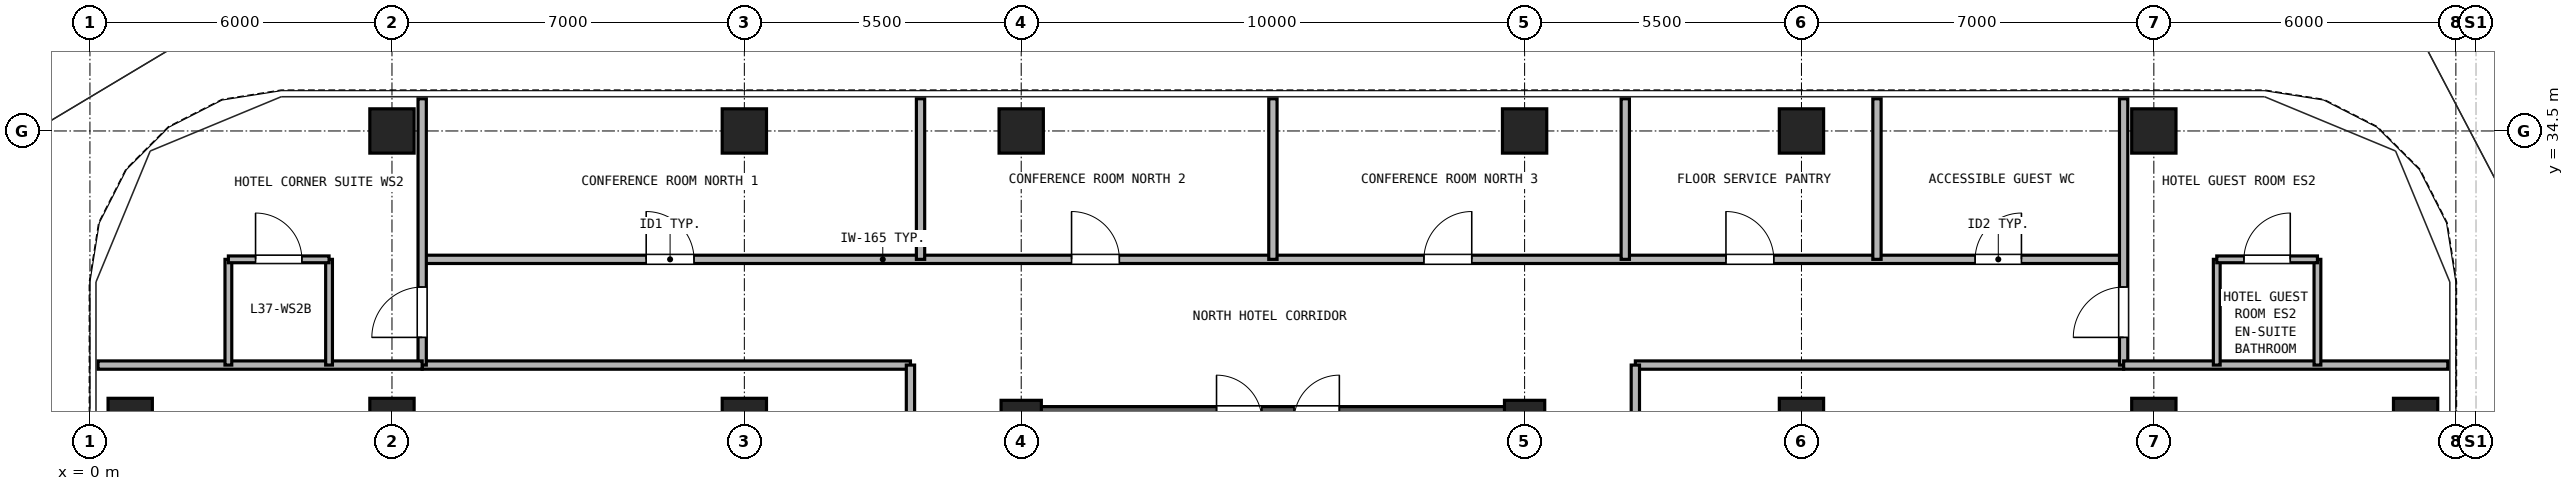
"""IFC4 building model, lengths in metres.
Left out: names, types, materials, properties, quantities, classifications, styles, units other than length and angle.
Written with IfcOpenShell. Run it as: python <this file> out.ifc"""

import sys

from ifc_helpers import new_model, si_unit, direction, frame, frame_2d, origin, origin_2d, place, context, subcontext, project, spatial, rectangle, hollow_rectangle, extrude, source, transform, mapped, element, fill, save


model = new_model("IFC4")
c1 = context("Model", 3, precision=1e-05, world=origin(), true_north=direction((0.0, 1.0)))
c2 = subcontext(c1, "Body", "Model", "MODEL_VIEW")
j1 = project(units=[si_unit("LENGTHUNIT", "METRE"), si_unit("PLANEANGLEUNIT", "RADIAN")], contexts=[c1])
p1 = place(None, origin())
s1 = spatial("IfcSite", under=j1, at=p1, CompositionType="ELEMENT")
p2 = place(p1, origin())
s2 = spatial("IfcBuilding", under=s1, at=p2, CompositionType="ELEMENT")
p3 = place(p2, frame((0.0, 0.0, 134.3)))
s3 = spatial("IfcBuildingStorey", under=s2, at=p3, CompositionType="ELEMENT", Elevation=134.3)
m1 = source(origin(), c2, "Body", "SweptSolid", [
    extrude(hollow_rectangle(XDim=0.88, YDim=0.88, WallThickness=0.05, at=origin_2d()), origin(), (0.0, 0.0, 1.0), 2.95),
])
for number, where, z_axis, x_axis in (
    (1, (6.0, 34.5, 0.0), (0.0, 0.0, 1.0), (1.0, 0.0, 0.0)),
    (2, (13.0, 34.5, 0.0), (0.0, 0.0, 1.0), (1.0, 0.0, 0.0)),
    (3, (18.5, 34.5, 0.0), (0.0, 0.0, 1.0), (1.0, 0.0, 0.0)),
    (4, (28.5, 34.5, 0.0), (0.0, 0.0, 1.0), (1.0, 0.0, 0.0)),
    (5, (34.0, 34.5, 0.0), (0.0, 0.0, 1.0), (1.0, 0.0, 0.0)),
    (6, (41.0, 34.5, 0.0), (0.0, 0.0, 1.0), (1.0, 0.0, 0.0)),
    (7, (0.8, 28.75, 0.0), (0.0, 0.0, 1.0), (1.0, 0.0, 0.0)),
    (8, (46.2, 28.75, 0.0), (0.0, 0.0, 1.0), (1.0, 0.0, 0.0)),
    (9, (6.0, 28.75, 0.0), (0.0, 0.0, 1.0), (1.0, 0.0, 0.0)),
    (10, (13.0, 28.75, 0.0), (0.0, 0.0, 1.0), (1.0, 0.0, 0.0)),
):
    element("IfcColumn", number, at=place(p3, frame(where, z_axis=z_axis, x_axis=x_axis)), inside=s3, PredefinedType="COLUMN", context=c2, shape_type="MappedRepresentation", body=[
        mapped(m1, transform((0.0, 0.0, 0.0), x_axis=(1.0, 0.0, 0.0), y_axis=(0.0, 1.0, 0.0), z_axis=(0.0, 0.0, 1.0), scale=1.0)),
    ])
m2 = source(origin(), c2, "Body", "SweptSolid", [
    extrude(hollow_rectangle(XDim=0.8, YDim=0.8, WallThickness=0.045, at=origin_2d()), origin(), (0.0, 0.0, 1.0), 2.95),
])
for number, where, z_axis, x_axis in (
    (11, (18.5, 28.75, 0.0), (0.0, 0.0, 1.0), (1.0, 0.0, 0.0)),
    (12, (28.5, 28.75, 0.0), (0.0, 0.0, 1.0), (1.0, 0.0, 0.0)),
):
    element("IfcColumn", number, at=place(p3, frame(where, z_axis=z_axis, x_axis=x_axis)), inside=s3, PredefinedType="COLUMN", context=c2, shape_type="MappedRepresentation", body=[
        mapped(m2, transform((0.0, 0.0, 0.0), x_axis=(1.0, 0.0, 0.0), y_axis=(0.0, 1.0, 0.0), z_axis=(0.0, 0.0, 1.0), scale=1.0)),
    ])
for number, where, z_axis, x_axis in (
    (13, (34.0, 28.75, 0.0), (0.0, 0.0, 1.0), (1.0, 0.0, 0.0)),
    (14, (41.0, 28.75, 0.0), (0.0, 0.0, 1.0), (1.0, 0.0, 0.0)),
):
    element("IfcColumn", number, at=place(p3, frame(where, z_axis=z_axis, x_axis=x_axis)), inside=s3, PredefinedType="COLUMN", context=c2, shape_type="MappedRepresentation", body=[
        mapped(m1, transform((0.0, 0.0, 0.0), x_axis=(1.0, 0.0, 0.0), y_axis=(0.0, 1.0, 0.0), z_axis=(0.0, 0.0, 1.0), scale=1.0)),
    ])
p4 = place(p3, frame((18.225, 28.75, 0.0), z_axis=(0.0, 0.0, 1.0), x_axis=(1.0, 0.0, 0.0)))
e15 = element("IfcWall", 15, at=p4, inside=s3, PredefinedType="SHEAR", context=c2, shape_type="SweptSolid", body=[
    extrude(rectangle(XDim=10.55, YDim=0.55, at=frame_2d((5.275, 0.0))), origin(), (0.0, 0.0, 1.0), 2.95),
])
p5 = place(p4, frame((4.155, 0.0, 0.0)))
e16 = element("IfcOpeningElement", 16, at=p5, cuts=e15, PredefinedType="OPENING", context=c2, shape_type="SweptSolid", body=[
    extrude(rectangle(XDim=0.9, YDim=2.05, at=frame_2d((0.45, 1.025))), frame((0.0, 0.285, 0.0), z_axis=(0.0, -1.0, 0.0), x_axis=(1.0, 0.0, 0.0)), (0.0, 0.0, 1.0), 0.57),
])
p6 = place(p4, frame((5.695, 0.0, 0.0)))
e17 = element("IfcOpeningElement", 17, at=p6, cuts=e15, PredefinedType="OPENING", context=c2, shape_type="SweptSolid", body=[
    extrude(rectangle(XDim=0.9, YDim=2.05, at=frame_2d((0.45, 1.025))), frame((0.0, 0.285, 0.0), z_axis=(0.0, -1.0, 0.0), x_axis=(1.0, 0.0, 0.0)), (0.0, 0.0, 1.0), 0.57),
])
p7 = place(p3, frame((6.6, 31.95, 0.0), z_axis=(0.0, 0.0, 1.0), x_axis=(1.0, 0.0, 0.0)))
e18 = element("IfcWall", 18, at=p7, inside=s3, PredefinedType="PARTITIONING", context=c2, shape_type="SweptSolid", body=[
    extrude(rectangle(XDim=33.8, YDim=0.165, at=frame_2d((16.9, 0.0))), origin(), (0.0, 0.0, 1.0), 2.95),
])
p8 = place(p7, frame((4.45, 0.0, 0.0)))
e19 = element("IfcOpeningElement", 19, at=p8, cuts=e18, PredefinedType="OPENING", context=c2, shape_type="SweptSolid", body=[
    extrude(rectangle(XDim=0.95, YDim=2.15, at=frame_2d((0.475, 1.075))), frame((0.0, 0.093, 0.0), z_axis=(0.0, -1.0, 0.0), x_axis=(1.0, 0.0, 0.0)), (0.0, 0.0, 1.0), 0.185),
])
p9 = place(p7, frame((12.9, 0.0, 0.0)))
e20 = element("IfcOpeningElement", 20, at=p9, cuts=e18, PredefinedType="OPENING", context=c2, shape_type="SweptSolid", body=[
    extrude(rectangle(XDim=0.95, YDim=2.15, at=frame_2d((0.475, 1.075))), frame((0.0, 0.093, 0.0), z_axis=(0.0, -1.0, 0.0), x_axis=(1.0, 0.0, 0.0)), (0.0, 0.0, 1.0), 0.185),
])
p10 = place(p7, frame((19.9, 0.0, 0.0)))
e21 = element("IfcOpeningElement", 21, at=p10, cuts=e18, PredefinedType="OPENING", context=c2, shape_type="SweptSolid", body=[
    extrude(rectangle(XDim=0.95, YDim=2.15, at=frame_2d((0.475, 1.075))), frame((0.0, 0.093, 0.0), z_axis=(0.0, -1.0, 0.0), x_axis=(1.0, 0.0, 0.0)), (0.0, 0.0, 1.0), 0.185),
])
p11 = place(p7, frame((25.9, 0.0, 0.0)))
e22 = element("IfcOpeningElement", 22, at=p11, cuts=e18, PredefinedType="OPENING", context=c2, shape_type="SweptSolid", body=[
    extrude(rectangle(XDim=0.95, YDim=2.15, at=frame_2d((0.475, 1.075))), frame((0.0, 0.093, 0.0), z_axis=(0.0, -1.0, 0.0), x_axis=(1.0, 0.0, 0.0)), (0.0, 0.0, 1.0), 0.185),
])
p12 = place(p7, frame((30.85, 0.0, 0.0)))
e23 = element("IfcOpeningElement", 23, at=p12, cuts=e18, PredefinedType="OPENING", context=c2, shape_type="SweptSolid", body=[
    extrude(rectangle(XDim=0.92, YDim=2.1, at=frame_2d((0.46, 1.05))), frame((0.0, 0.093, 0.0), z_axis=(0.0, -1.0, 0.0), x_axis=(1.0, 0.0, 0.0)), (0.0, 0.0, 1.0), 0.185),
])
for number, where, z_axis, x_axis in (
    (24, (6.6, 29.85, 0.0), (0.0, 0.0, 1.0), (1.0, 0.0, 0.0)),
    (25, (30.7, 29.85, 0.0), (0.0, 0.0, 1.0), (1.0, 0.0, 0.0)),
):
    element("IfcWall", number, at=place(p3, frame(where, z_axis=z_axis, x_axis=x_axis)), inside=s3, PredefinedType="PARTITIONING", context=c2, shape_type="SweptSolid", body=[
        extrude(rectangle(XDim=9.7, YDim=0.165, at=frame_2d((4.85, 0.0))), origin(), (0.0, 0.0, 1.0), 2.95),
    ])
p13 = place(p3, frame((16.3, 11.15, 0.0), z_axis=(0.0, 0.0, 1.0), x_axis=(0.0, 1.0, 0.0)))
e26 = element("IfcWall", 26, at=p13, inside=s3, PredefinedType="PARTITIONING", context=c2, shape_type="SweptSolid", body=[
    extrude(rectangle(XDim=18.7, YDim=0.165, at=frame_2d((9.35, 0.0))), origin(), (0.0, 0.0, 1.0), 2.95),
])
p14 = place(p13, frame((2.75, 0.0, 0.0)))
e27 = element("IfcOpeningElement", 27, at=p14, cuts=e26, PredefinedType="OPENING", context=c2, shape_type="SweptSolid", body=[
    extrude(rectangle(XDim=0.95, YDim=2.15, at=frame_2d((0.475, 1.075))), frame((0.0, 0.093, 0.0), z_axis=(0.0, -1.0, 0.0), x_axis=(1.0, 0.0, 0.0)), (0.0, 0.0, 1.0), 0.185),
])
p15 = place(p13, frame((12.1, 0.0, 0.0)))
e28 = element("IfcOpeningElement", 28, at=p15, cuts=e26, PredefinedType="OPENING", context=c2, shape_type="SweptSolid", body=[
    extrude(rectangle(XDim=0.95, YDim=2.15, at=frame_2d((0.475, 1.075))), frame((0.0, 0.093, 0.0), z_axis=(0.0, -1.0, 0.0), x_axis=(1.0, 0.0, 0.0)), (0.0, 0.0, 1.0), 0.185),
])
p16 = place(p3, frame((30.7, 11.15, 0.0), z_axis=(0.0, 0.0, 1.0), x_axis=(0.0, 1.0, 0.0)))
e29 = element("IfcWall", 29, at=p16, inside=s3, PredefinedType="PARTITIONING", context=c2, shape_type="SweptSolid", body=[
    extrude(rectangle(XDim=18.7, YDim=0.165, at=frame_2d((9.35, 0.0))), origin(), (0.0, 0.0, 1.0), 2.95),
])
p17 = place(p16, frame((4.175, 0.0, 0.0)))
e30 = element("IfcOpeningElement", 30, at=p17, cuts=e29, PredefinedType="OPENING", context=c2, shape_type="SweptSolid", body=[
    extrude(rectangle(XDim=0.95, YDim=2.15, at=frame_2d((0.475, 1.075))), frame((0.0, 0.093, 0.0), z_axis=(0.0, -1.0, 0.0), x_axis=(1.0, 0.0, 0.0)), (0.0, 0.0, 1.0), 0.185),
])
p18 = place(p16, frame((13.525, 0.0, 0.0)))
e31 = element("IfcOpeningElement", 31, at=p18, cuts=e29, PredefinedType="OPENING", context=c2, shape_type="SweptSolid", body=[
    extrude(rectangle(XDim=0.95, YDim=2.15, at=frame_2d((0.475, 1.075))), frame((0.0, 0.093, 0.0), z_axis=(0.0, -1.0, 0.0), x_axis=(1.0, 0.0, 0.0)), (0.0, 0.0, 1.0), 0.185),
])
p19 = place(p3, frame((6.6, 29.85, 0.0), z_axis=(0.0, 0.0, 1.0), x_axis=(0.0, 1.0, 0.0)))
e32 = element("IfcWall", 32, at=p19, inside=s3, PredefinedType="PARTITIONING", context=c2, shape_type="SweptSolid", body=[
    extrude(rectangle(XDim=5.29, YDim=0.165, at=frame_2d((2.645, 0.0))), origin(), (0.0, 0.0, 1.0), 2.95),
])
p20 = place(p19, frame((0.55, 0.0, 0.0)))
e33 = element("IfcOpeningElement", 33, at=p20, cuts=e32, PredefinedType="OPENING", context=c2, shape_type="SweptSolid", body=[
    extrude(rectangle(XDim=1.0, YDim=2.15, at=frame_2d((0.5, 1.075))), frame((0.0, 0.093, 0.0), z_axis=(0.0, -1.0, 0.0), x_axis=(1.0, 0.0, 0.0)), (0.0, 0.0, 1.0), 0.185),
])
p21 = place(p3, frame((40.4, 29.85, 0.0), z_axis=(0.0, 0.0, 1.0), x_axis=(0.0, 1.0, 0.0)))
e34 = element("IfcWall", 34, at=p21, inside=s3, PredefinedType="PARTITIONING", context=c2, shape_type="SweptSolid", body=[
    extrude(rectangle(XDim=5.29, YDim=0.165, at=frame_2d((2.645, 0.0))), origin(), (0.0, 0.0, 1.0), 2.95),
])
p22 = place(p21, frame((0.55, 0.0, 0.0)))
e35 = element("IfcOpeningElement", 35, at=p22, cuts=e34, PredefinedType="OPENING", context=c2, shape_type="SweptSolid", body=[
    extrude(rectangle(XDim=1.0, YDim=2.15, at=frame_2d((0.5, 1.075))), frame((0.0, 0.093, 0.0), z_axis=(0.0, -1.0, 0.0), x_axis=(1.0, 0.0, 0.0)), (0.0, 0.0, 1.0), 0.185),
])
for number, where, z_axis, x_axis in (
    (36, (0.16, 29.85, 0.0), (0.0, 0.0, 1.0), (1.0, 0.0, 0.0)),
    (37, (40.4, 29.85, 0.0), (0.0, 0.0, 1.0), (1.0, 0.0, 0.0)),
):
    element("IfcWall", number, at=place(p3, frame(where, z_axis=z_axis, x_axis=x_axis)), inside=s3, PredefinedType="PARTITIONING", context=c2, shape_type="SweptSolid", body=[
        extrude(rectangle(XDim=6.44, YDim=0.165, at=frame_2d((3.22, 0.0))), origin(), (0.0, 0.0, 1.0), 2.95),
    ])
for number, where, z_axis, x_axis in (
    (38, (2.75, 29.85, 0.0), (0.0, 0.0, 1.0), (0.0, 1.0, 0.0)),
    (39, (4.75, 29.85, 0.0), (0.0, 0.0, 1.0), (0.0, 1.0, 0.0)),
):
    element("IfcWall", number, at=place(p3, frame(where, z_axis=z_axis, x_axis=x_axis)), inside=s3, PredefinedType="PARTITIONING", context=c2, shape_type="SweptSolid", body=[
        extrude(rectangle(XDim=2.1, YDim=0.135, at=frame_2d((1.05, 0.0))), origin(), (0.0, 0.0, 1.0), 2.95),
    ])
p23 = place(p3, frame((2.75, 31.95, 0.0), z_axis=(0.0, 0.0, 1.0), x_axis=(1.0, 0.0, 0.0)))
e40 = element("IfcWall", 40, at=p23, inside=s3, PredefinedType="PARTITIONING", context=c2, shape_type="SweptSolid", body=[
    extrude(rectangle(XDim=2.0, YDim=0.135, at=frame_2d((1.0, 0.0))), origin(), (0.0, 0.0, 1.0), 2.95),
])
p24 = place(p23, frame((0.54, 0.0, 0.0)))
e41 = element("IfcOpeningElement", 41, at=p24, cuts=e40, PredefinedType="OPENING", context=c2, shape_type="SweptSolid", body=[
    extrude(rectangle(XDim=0.92, YDim=2.1, at=frame_2d((0.46, 1.05))), frame((0.0, 0.077, 0.0), z_axis=(0.0, -1.0, 0.0), x_axis=(1.0, 0.0, 0.0)), (0.0, 0.0, 1.0), 0.155),
])
for number, where, z_axis, x_axis in (
    (42, (42.25, 29.85, 0.0), (0.0, 0.0, 1.0), (0.0, 1.0, 0.0)),
    (43, (44.25, 29.85, 0.0), (0.0, 0.0, 1.0), (0.0, 1.0, 0.0)),
):
    element("IfcWall", number, at=place(p3, frame(where, z_axis=z_axis, x_axis=x_axis)), inside=s3, PredefinedType="PARTITIONING", context=c2, shape_type="SweptSolid", body=[
        extrude(rectangle(XDim=2.1, YDim=0.135, at=frame_2d((1.05, 0.0))), origin(), (0.0, 0.0, 1.0), 2.95),
    ])
p25 = place(p3, frame((42.25, 31.95, 0.0), z_axis=(0.0, 0.0, 1.0), x_axis=(1.0, 0.0, 0.0)))
e44 = element("IfcWall", 44, at=p25, inside=s3, PredefinedType="PARTITIONING", context=c2, shape_type="SweptSolid", body=[
    extrude(rectangle(XDim=2.0, YDim=0.135, at=frame_2d((1.0, 0.0))), origin(), (0.0, 0.0, 1.0), 2.95),
])
p26 = place(p25, frame((0.54, 0.0, 0.0)))
e45 = element("IfcOpeningElement", 45, at=p26, cuts=e44, PredefinedType="OPENING", context=c2, shape_type="SweptSolid", body=[
    extrude(rectangle(XDim=0.92, YDim=2.1, at=frame_2d((0.46, 1.05))), frame((0.0, 0.077, 0.0), z_axis=(0.0, -1.0, 0.0), x_axis=(1.0, 0.0, 0.0)), (0.0, 0.0, 1.0), 0.155),
])
for number, where, z_axis, x_axis in (
    (46, (16.5, 31.95, 0.0), (0.0, 0.0, 1.0), (0.0, 1.0, 0.0)),
    (47, (23.5, 31.95, 0.0), (0.0, 0.0, 1.0), (0.0, 1.0, 0.0)),
    (48, (30.5, 31.95, 0.0), (0.0, 0.0, 1.0), (0.0, 1.0, 0.0)),
    (49, (35.5, 31.95, 0.0), (0.0, 0.0, 1.0), (0.0, 1.0, 0.0)),
):
    element("IfcWall", number, at=place(p3, frame(where, z_axis=z_axis, x_axis=x_axis)), inside=s3, PredefinedType="PARTITIONING", context=c2, shape_type="SweptSolid", body=[
        extrude(rectangle(XDim=3.19, YDim=0.165, at=frame_2d((1.595, 0.0))), origin(), (0.0, 0.0, 1.0), 2.95),
    ])
p27 = place(p24, frame((0.92, 0.0, 0.0), z_axis=(0.0, 0.0, 1.0), x_axis=(-1.0, 0.0, 0.0)))
e50 = element("IfcDoor", 50, at=p27, inside=s3, OperationType="SINGLE_SWING_LEFT", PredefinedType="DOOR", context=c2, shape_type="SweptSolid", body=[
    extrude(rectangle(XDim=0.92, YDim=2.1, at=frame_2d((0.46, 1.05))), frame((0.0, 0.025, 0.0), z_axis=(0.0, -1.0, 0.0), x_axis=(1.0, 0.0, 0.0)), (0.0, 0.0, 1.0), 0.05),
])
fill(e41, e50)
p28 = place(p20, origin())
e51 = element("IfcDoor", 51, at=p28, inside=s3, OperationType="SINGLE_SWING_LEFT", PredefinedType="DOOR", context=c2, shape_type="SweptSolid", body=[
    extrude(rectangle(XDim=1.0, YDim=2.15, at=frame_2d((0.5, 1.075))), frame((0.0, 0.025, 0.0), z_axis=(0.0, -1.0, 0.0), x_axis=(1.0, 0.0, 0.0)), (0.0, 0.0, 1.0), 0.05),
])
fill(e33, e51)
p29 = place(p26, frame((0.92, 0.0, 0.0), z_axis=(0.0, 0.0, 1.0), x_axis=(-1.0, 0.0, 0.0)))
e52 = element("IfcDoor", 52, at=p29, inside=s3, OperationType="SINGLE_SWING_RIGHT", PredefinedType="DOOR", context=c2, shape_type="SweptSolid", body=[
    extrude(rectangle(XDim=0.92, YDim=2.1, at=frame_2d((0.46, 1.05))), frame((0.0, 0.025, 0.0), z_axis=(0.0, -1.0, 0.0), x_axis=(1.0, 0.0, 0.0)), (0.0, 0.0, 1.0), 0.05),
])
fill(e45, e52)
p30 = place(p22, frame((1.0, 0.0, 0.0), z_axis=(0.0, 0.0, 1.0), x_axis=(-1.0, 0.0, 0.0)))
e53 = element("IfcDoor", 53, at=p30, inside=s3, OperationType="SINGLE_SWING_LEFT", PredefinedType="DOOR", context=c2, shape_type="SweptSolid", body=[
    extrude(rectangle(XDim=1.0, YDim=2.15, at=frame_2d((0.5, 1.075))), frame((0.0, 0.025, 0.0), z_axis=(0.0, -1.0, 0.0), x_axis=(1.0, 0.0, 0.0)), (0.0, 0.0, 1.0), 0.05),
])
fill(e35, e53)
p31 = place(p8, origin())
e54 = element("IfcDoor", 54, at=p31, inside=s3, OperationType="SINGLE_SWING_LEFT", PredefinedType="DOOR", context=c2, shape_type="SweptSolid", body=[
    extrude(rectangle(XDim=0.95, YDim=2.15, at=frame_2d((0.475, 1.075))), frame((0.0, 0.025, 0.0), z_axis=(0.0, -1.0, 0.0), x_axis=(1.0, 0.0, 0.0)), (0.0, 0.0, 1.0), 0.05),
])
fill(e19, e54)
p32 = place(p9, origin())
e55 = element("IfcDoor", 55, at=p32, inside=s3, OperationType="SINGLE_SWING_LEFT", PredefinedType="DOOR", context=c2, shape_type="SweptSolid", body=[
    extrude(rectangle(XDim=0.95, YDim=2.15, at=frame_2d((0.475, 1.075))), frame((0.0, 0.025, 0.0), z_axis=(0.0, -1.0, 0.0), x_axis=(1.0, 0.0, 0.0)), (0.0, 0.0, 1.0), 0.05),
])
fill(e20, e55)
p33 = place(p10, origin())
e56 = element("IfcDoor", 56, at=p33, inside=s3, OperationType="SINGLE_SWING_RIGHT", PredefinedType="DOOR", context=c2, shape_type="SweptSolid", body=[
    extrude(rectangle(XDim=0.95, YDim=2.15, at=frame_2d((0.475, 1.075))), frame((0.0, 0.025, 0.0), z_axis=(0.0, -1.0, 0.0), x_axis=(1.0, 0.0, 0.0)), (0.0, 0.0, 1.0), 0.05),
])
fill(e21, e56)
p34 = place(p11, origin())
e57 = element("IfcDoor", 57, at=p34, inside=s3, OperationType="SINGLE_SWING_LEFT", PredefinedType="DOOR", context=c2, shape_type="SweptSolid", body=[
    extrude(rectangle(XDim=0.95, YDim=2.15, at=frame_2d((0.475, 1.075))), frame((0.0, 0.025, 0.0), z_axis=(0.0, -1.0, 0.0), x_axis=(1.0, 0.0, 0.0)), (0.0, 0.0, 1.0), 0.05),
])
fill(e22, e57)
p35 = place(p12, origin())
e58 = element("IfcDoor", 58, at=p35, inside=s3, OperationType="SINGLE_SWING_RIGHT", PredefinedType="DOOR", context=c2, shape_type="SweptSolid", body=[
    extrude(rectangle(XDim=0.92, YDim=2.1, at=frame_2d((0.46, 1.05))), frame((0.0, 0.025, 0.0), z_axis=(0.0, -1.0, 0.0), x_axis=(1.0, 0.0, 0.0)), (0.0, 0.0, 1.0), 0.05),
])
fill(e23, e58)
save(model, sys.argv[1])
